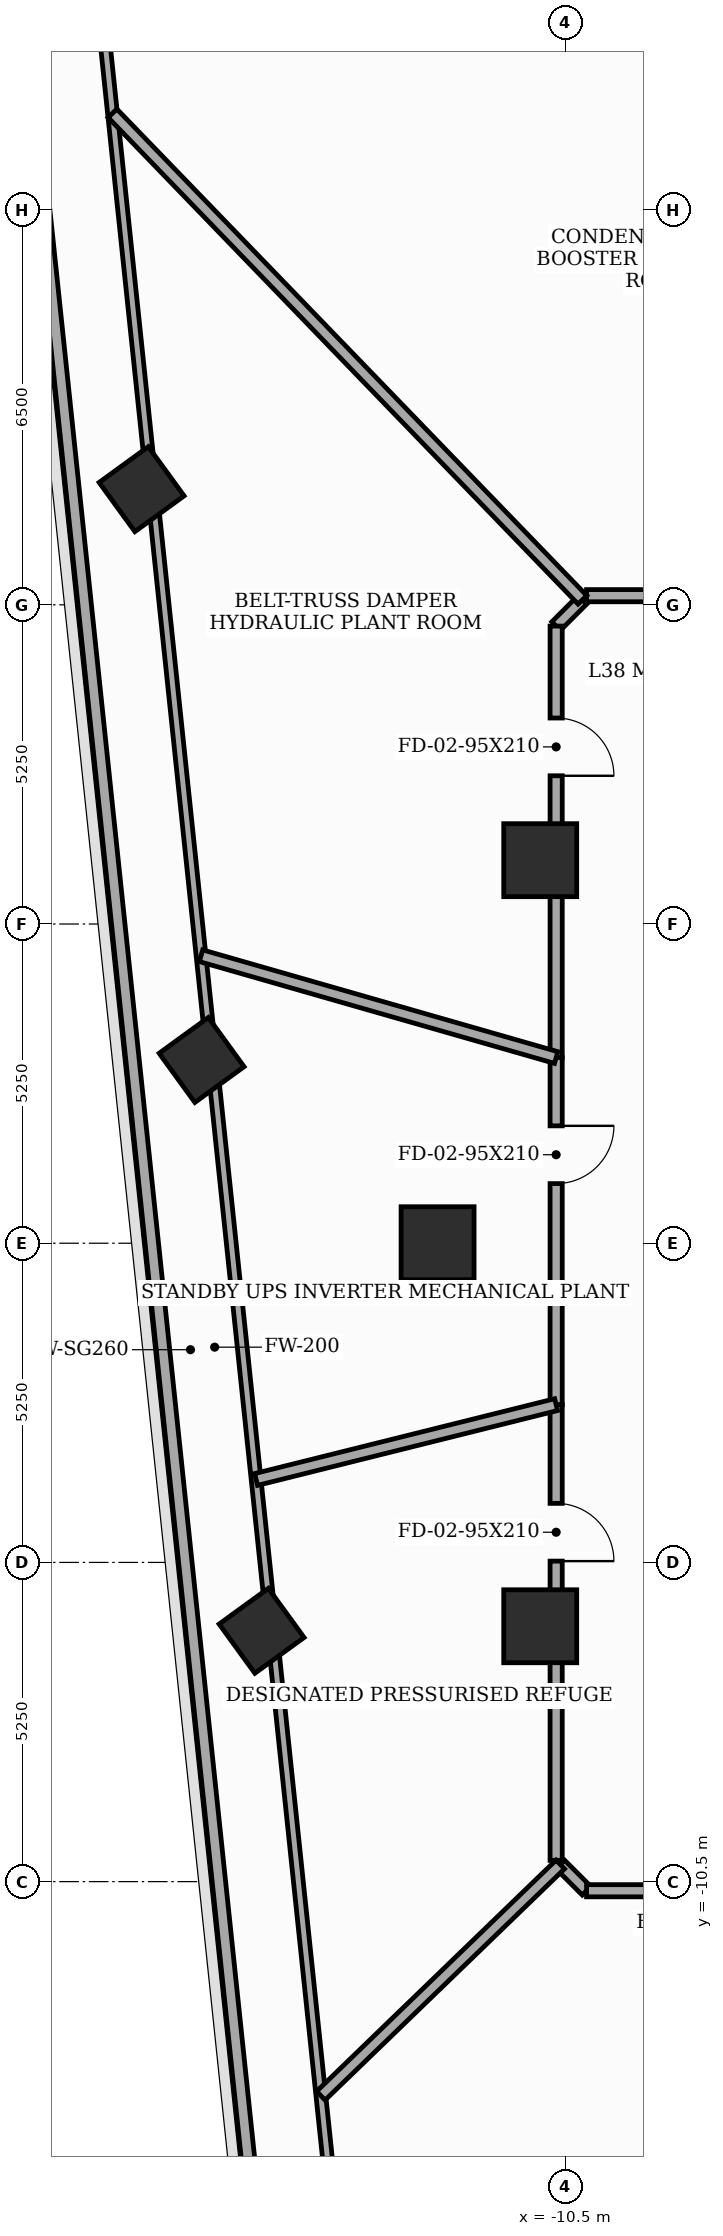
"""IFC4 building model, lengths in metres.
Left out: names, types, materials, properties, quantities, classifications, styles, units other than length and angle.
Written with IfcOpenShell. Run it as: python <this file> out.ifc"""

import sys

from ifc_helpers import new_model, si_unit, direction, frame, frame_2d, origin, origin_2d, place, context, subcontext, project, spatial, rectangle, extrude, element, fill, save


model = new_model("IFC4")
c1 = context("Model", 3, precision=1e-05, world=origin(), true_north=direction((0.0, 1.0)))
c2 = subcontext(c1, "Body", "Model", "MODEL_VIEW")
j1 = project(units=[si_unit("LENGTHUNIT", "METRE"), si_unit("PLANEANGLEUNIT", "RADIAN")], contexts=[c1])
p1 = place(None, origin())
s1 = spatial("IfcSite", under=j1, at=p1, CompositionType="ELEMENT")
p2 = place(p1, origin())
s2 = spatial("IfcBuilding", under=s1, at=p2, CompositionType="ELEMENT")
p3 = place(p2, frame((0.0, 0.0, 149.5)))
s3 = spatial("IfcBuildingStorey", under=s2, at=p3, CompositionType="ELEMENT", Elevation=149.5)
for number, where, z_axis, x_axis in (
    (1, (-10.912, 6.3, 0.0), (0.0, 0.0, 1.0), (1.0, 0.0, 0.0)),
    (2, (-12.6, 0.0, 0.0), (0.0, 0.0, 1.0), (1.0, 0.0, 0.0)),
    (3, (-10.912, -6.3, 0.0), (0.0, 0.0, 1.0), (1.0, 0.0, 0.0)),
):
    element("IfcColumn", number, at=place(p3, frame(where, z_axis=z_axis, x_axis=x_axis)), inside=s3, PredefinedType="COLUMN", context=c2, shape_type="SweptSolid", body=[
        extrude(rectangle(XDim=1.2, YDim=1.2, at=origin_2d()), origin(), (0.0, 0.0, 1.0), 5.1),
    ])
for number, where, z_axis, x_axis in (
    (4, (-17.468, 12.402, 0.0), (0.0, 0.0, 1.0), (0.809, 0.588, 0.0)),
    (5, (-16.481, 3.014, 0.0), (0.0, 0.0, 1.0), (0.809, 0.588, 0.0)),
    (6, (-15.494, -6.375, 0.0), (0.0, 0.0, 1.0), (0.809, 0.588, 0.0)),
):
    element("IfcColumn", number, at=place(p3, frame(where, z_axis=z_axis, x_axis=x_axis)), inside=s3, PredefinedType="COLUMN", context=c2, shape_type="SweptSolid", body=[
        extrude(rectangle(XDim=1.0, YDim=1.0, at=origin_2d()), origin(), (0.0, 0.0, 1.0), 5.1),
    ])
p4 = place(p3, frame((28.558, 6.119, 0.0), z_axis=(0.0, 0.0, 1.0), x_axis=(-0.913545370604, 0.406736838568, 0.0)))
e7 = element("IfcWall", 7, at=p4, inside=s3, PredefinedType="SOLIDWALL", context=c2, shape_type="SweptSolid", body=[
    extrude(rectangle(XDim=47.2, YDim=0.22, at=frame_2d((23.6, 0.0))), origin(), (0.0, 0.0, 1.0), 4.4),
])
p5 = place(p3, frame((-19.578, 21.672, 0.0), z_axis=(0.0, 0.0, 1.0), x_axis=(0.104529964142, -0.994521737619, 0.0)))
e8 = element("IfcWall", 8, at=p5, inside=s3, PredefinedType="SOLIDWALL", context=c2, shape_type="SweptSolid", body=[
    extrude(rectangle(XDim=47.2, YDim=0.22, at=frame_2d((23.6, 0.0))), origin(), (0.0, 0.0, 1.0), 4.4),
])
p6 = place(p3, frame((-13.371, -24.947, 0.0), z_axis=(0.0, 0.0, 1.0), x_axis=(-0.104525741645, 0.994522181419, 0.0)))
e9 = element("IfcWall", 9, at=p6, inside=s3, PredefinedType="SOLIDWALL", context=c2, shape_type="SweptSolid", body=[
    extrude(rectangle(XDim=46.826, YDim=0.16, at=frame_2d((23.413, 0.0))), origin(), (0.0, 0.0, 1.0), 3.485),
])
p7 = place(p3, frame((-14.919, 24.053, 0.0), z_axis=(0.0, 0.0, 1.0), x_axis=(0.913544749662, -0.406738233223, 0.0)))
e10 = element("IfcWall", 10, at=p7, inside=s3, PredefinedType="SOLIDWALL", context=c2, shape_type="SweptSolid", body=[
    extrude(rectangle(XDim=46.826, YDim=0.16, at=frame_2d((23.413, 0.0))), origin(), (0.0, 0.0, 1.0), 3.485),
])
p8 = place(p3, frame((28.291, 0.894, 0.0), z_axis=(0.0, 0.0, 1.0), x_axis=(-0.80901669073, -0.587785670223, 0.0)))
e11 = element("IfcWall", 11, at=p8, inside=s3, PredefinedType="SOLIDWALL", context=c2, shape_type="SweptSolid", body=[
    extrude(rectangle(XDim=46.826, YDim=0.16, at=frame_2d((23.413, 0.0))), origin(), (0.0, 0.0, 1.0), 3.485),
])
p9 = place(p3, frame((-10.65, -2.655, 0.0), z_axis=(0.0, 0.0, 1.0), x_axis=(0.0, -1.0, 0.0)))
e12 = element("IfcWall", 12, at=p9, inside=s3, PredefinedType="SOLIDWALL", context=c2, shape_type="SweptSolid", body=[
    extrude(rectangle(XDim=7.495, YDim=0.2, at=frame_2d((3.748, 0.0))), origin(), (0.0, 0.0, 1.0), 4.285),
])
p10 = place(p9, frame((1.624, 0.0, 0.0)))
e13 = element("IfcOpeningElement", 13, at=p10, cuts=e12, PredefinedType="OPENING", context=c2, shape_type="SweptSolid", body=[
    extrude(rectangle(XDim=0.95, YDim=2.1, at=frame_2d((0.475, 1.05))), frame((0.0, 0.11, 0.0), z_axis=(0.0, -1.0, 0.0), x_axis=(1.0, 0.0, 0.0)), (0.0, 0.0, 1.0), 0.22),
])
p11 = place(p3, frame((-10.582, -10.218, 0.0), z_axis=(0.0, 0.0, 1.0), x_axis=(0.70730655707, -0.706906948845, 0.0)))
e14 = element("IfcWall", 14, at=p11, inside=s3, PredefinedType="SOLIDWALL", context=c2, shape_type="SweptSolid", body=[
    extrude(rectangle(XDim=0.611, YDim=0.2, at=frame_2d((0.305, 0.0))), origin(), (0.0, 0.0, 1.0), 4.9),
])
p12 = place(p3, frame((-10.15, -10.65, 0.0), z_axis=(0.0, 0.0, 1.0), x_axis=(1.0, 0.0, 0.0)))
e15 = element("IfcWall", 15, at=p12, inside=s3, PredefinedType="SOLIDWALL", context=c2, shape_type="SweptSolid", body=[
    extrude(rectangle(XDim=7.096, YDim=0.2, at=frame_2d((3.548, 0.0))), origin(), (0.0, 0.0, 1.0), 3.485),
])
p13 = place(p12, frame((1.512, 0.0, 0.0)))
e16 = element("IfcOpeningElement", 16, at=p13, cuts=e15, PredefinedType="OPENING", context=c2, shape_type="SweptSolid", body=[
    extrude(rectangle(XDim=0.95, YDim=2.1, at=frame_2d((0.475, 1.05))), frame((0.0, 0.11, 0.0), z_axis=(0.0, -1.0, 0.0), x_axis=(1.0, 0.0, 0.0)), (0.0, 0.0, 1.0), 0.22),
])
p14 = place(p3, frame((-2.655, 10.65, 0.0), z_axis=(0.0, 0.0, 1.0), x_axis=(-1.0, 0.0, 0.0)))
e17 = element("IfcWall", 17, at=p14, inside=s3, PredefinedType="SOLIDWALL", context=c2, shape_type="SweptSolid", body=[
    extrude(rectangle(XDim=7.495, YDim=0.2, at=frame_2d((3.748, 0.0))), origin(), (0.0, 0.0, 1.0), 4.285),
])
p15 = place(p14, frame((1.624, 0.0, 0.0)))
e18 = element("IfcOpeningElement", 18, at=p15, cuts=e17, PredefinedType="OPENING", context=c2, shape_type="SweptSolid", body=[
    extrude(rectangle(XDim=0.95, YDim=2.1, at=frame_2d((0.475, 1.05))), frame((0.0, 0.11, 0.0), z_axis=(0.0, -1.0, 0.0), x_axis=(1.0, 0.0, 0.0)), (0.0, 0.0, 1.0), 0.22),
])
p16 = place(p3, frame((-10.218, 10.582, 0.0), z_axis=(0.0, 0.0, 1.0), x_axis=(-0.706906948845, -0.70730655707, 0.0)))
e19 = element("IfcWall", 19, at=p16, inside=s3, PredefinedType="SOLIDWALL", context=c2, shape_type="SweptSolid", body=[
    extrude(rectangle(XDim=0.611, YDim=0.2, at=frame_2d((0.305, 0.0))), origin(), (0.0, 0.0, 1.0), 4.9),
])
p17 = place(p3, frame((-10.65, 10.15, 0.0), z_axis=(0.0, 0.0, 1.0), x_axis=(0.0, -1.0, 0.0)))
e20 = element("IfcWall", 20, at=p17, inside=s3, PredefinedType="SOLIDWALL", context=c2, shape_type="SweptSolid", body=[
    extrude(rectangle(XDim=7.096, YDim=0.2, at=frame_2d((3.548, 0.0))), origin(), (0.0, 0.0, 1.0), 3.485),
])
p18 = place(p17, frame((1.512, 0.0, 0.0)))
e21 = element("IfcOpeningElement", 21, at=p18, cuts=e20, PredefinedType="OPENING", context=c2, shape_type="SweptSolid", body=[
    extrude(rectangle(XDim=0.95, YDim=2.1, at=frame_2d((0.475, 1.05))), frame((0.0, 0.11, 0.0), z_axis=(0.0, -1.0, 0.0), x_axis=(1.0, 0.0, 0.0)), (0.0, 0.0, 1.0), 0.22),
])
p19 = place(p3, frame((-10.65, 3.054, 0.0), z_axis=(0.0, 0.0, 1.0), x_axis=(0.0, -1.0, 0.0)))
e22 = element("IfcWall", 22, at=p19, inside=s3, PredefinedType="SOLIDWALL", context=c2, shape_type="SweptSolid", body=[
    extrude(rectangle(XDim=5.709, YDim=0.2, at=frame_2d((2.854, 0.0))), origin(), (0.0, 0.0, 1.0), 4.285),
])
p20 = place(p19, frame((1.124, 0.0, 0.0)))
e23 = element("IfcOpeningElement", 23, at=p20, cuts=e22, PredefinedType="OPENING", context=c2, shape_type="SweptSolid", body=[
    extrude(rectangle(XDim=0.95, YDim=2.1, at=frame_2d((0.475, 1.05))), frame((0.0, 0.11, 0.0), z_axis=(0.0, -1.0, 0.0), x_axis=(1.0, 0.0, 0.0)), (0.0, 0.0, 1.0), 0.22),
])
p21 = place(p3, frame((-14.519, -14.021, 0.0), z_axis=(0.0, 0.0, 1.0), x_axis=(0.719220851496, 0.69478152449, 0.0)))
e24 = element("IfcWall", 24, at=p21, inside=s3, PredefinedType="SOLIDWALL", context=c2, shape_type="SweptSolid", body=[
    extrude(rectangle(XDim=5.474, YDim=0.2, at=frame_2d((2.737, 0.0))), origin(), (0.0, 0.0, 1.0), 3.485),
])
p22 = place(p3, frame((-10.65, -2.655, 0.0), z_axis=(0.0, 0.0, 1.0), x_axis=(-0.970272243422, -0.242016060717, 0.0)))
e25 = element("IfcWall", 25, at=p22, inside=s3, PredefinedType="SOLIDWALL", context=c2, shape_type="SweptSolid", body=[
    extrude(rectangle(XDim=5.086, YDim=0.2, at=frame_2d((2.543, 0.0))), origin(), (0.0, 0.0, 1.0), 3.485),
])
p23 = place(p3, frame((-17.946, 18.584, 0.0), z_axis=(0.0, 0.0, 1.0), x_axis=(0.694677144831, -0.719321669665, 0.0)))
e26 = element("IfcWall", 26, at=p23, inside=s3, PredefinedType="SOLIDWALL", context=c2, shape_type="SweptSolid", body=[
    extrude(rectangle(XDim=11.125, YDim=0.2, at=frame_2d((5.562, 0.0))), origin(), (0.0, 0.0, 1.0), 3.485),
])
p24 = place(p3, frame((-16.49, 4.728, 0.0), z_axis=(0.0, 0.0, 1.0), x_axis=(0.961285504411, -0.275554312267, 0.0)))
e27 = element("IfcWall", 27, at=p24, inside=s3, PredefinedType="SOLIDWALL", context=c2, shape_type="SweptSolid", body=[
    extrude(rectangle(XDim=6.075, YDim=0.2, at=frame_2d((3.038, 0.0))), origin(), (0.0, 0.0, 1.0), 3.485),
])
p25 = place(p10, origin())
e28 = element("IfcDoor", 28, at=p25, inside=s3, OperationType="SINGLE_SWING_RIGHT", PredefinedType="DOOR", context=c2, shape_type="SweptSolid", body=[
    extrude(rectangle(XDim=0.95, YDim=2.1, at=frame_2d((0.475, 1.05))), frame((0.0, 0.025, 0.0), z_axis=(0.0, -1.0, 0.0), x_axis=(1.0, 0.0, 0.0)), (0.0, 0.0, 1.0), 0.05),
])
fill(e13, e28)
p26 = place(p18, origin())
e29 = element("IfcDoor", 29, at=p26, inside=s3, OperationType="SINGLE_SWING_RIGHT", PredefinedType="DOOR", context=c2, shape_type="SweptSolid", body=[
    extrude(rectangle(XDim=0.95, YDim=2.1, at=frame_2d((0.475, 1.05))), frame((0.0, 0.025, 0.0), z_axis=(0.0, -1.0, 0.0), x_axis=(1.0, 0.0, 0.0)), (0.0, 0.0, 1.0), 0.05),
])
fill(e21, e29)
p27 = place(p20, origin())
e30 = element("IfcDoor", 30, at=p27, inside=s3, OperationType="SINGLE_SWING_LEFT", PredefinedType="DOOR", context=c2, shape_type="SweptSolid", body=[
    extrude(rectangle(XDim=0.95, YDim=2.1, at=frame_2d((0.475, 1.05))), frame((0.0, 0.025, 0.0), z_axis=(0.0, -1.0, 0.0), x_axis=(1.0, 0.0, 0.0)), (0.0, 0.0, 1.0), 0.05),
])
fill(e23, e30)
save(model, sys.argv[1])
